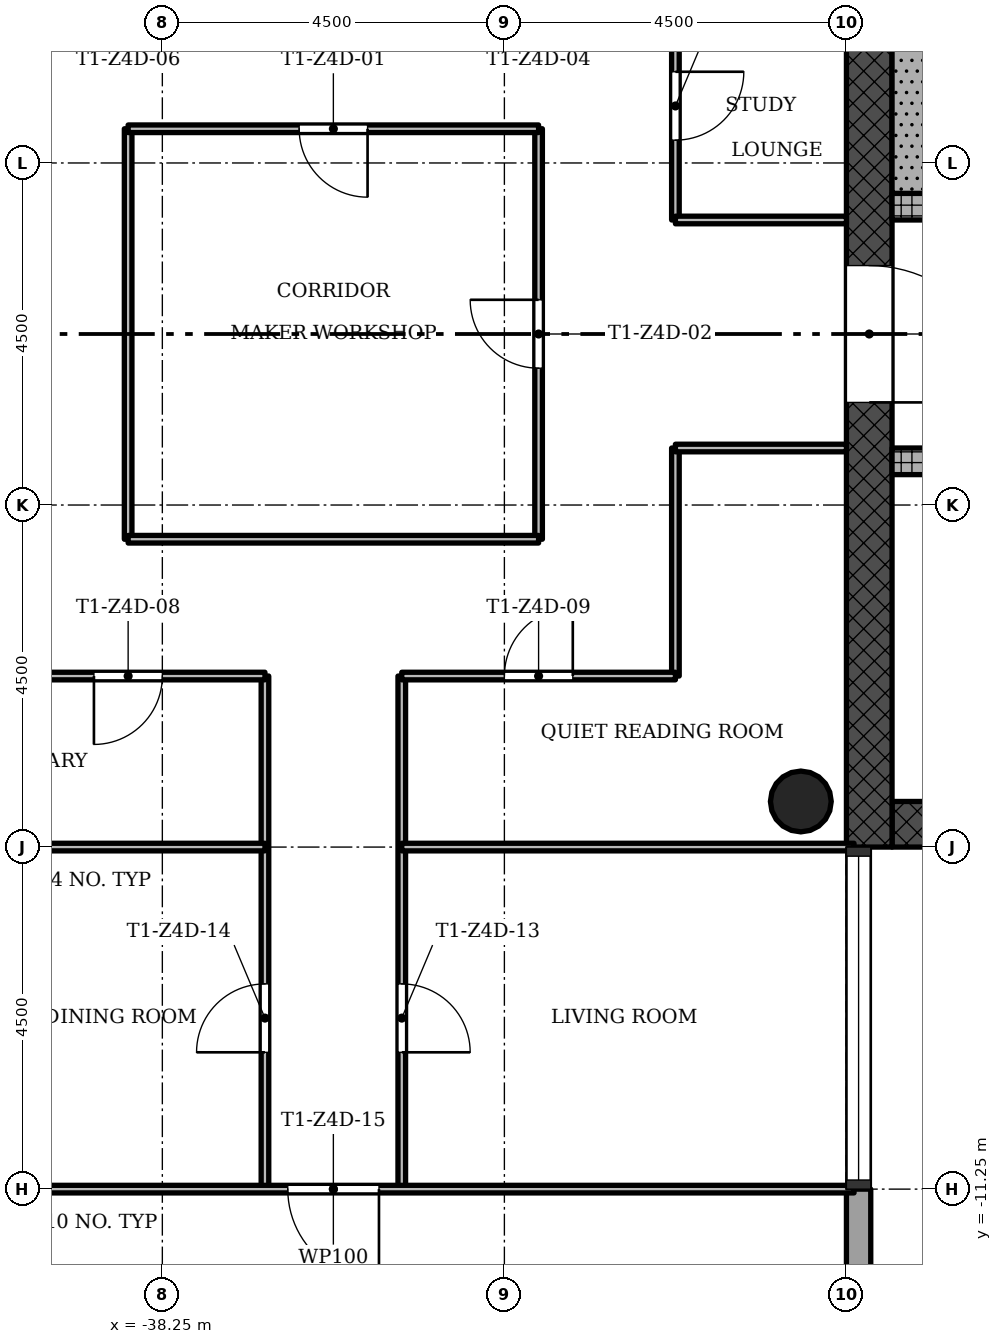
"""IFC4 building model, lengths in metres.
Left out: names, types, materials, properties, quantities, classifications, styles, units other than length and angle.
Written with IfcOpenShell. Run it as: python <this file> out.ifc"""

import sys

from ifc_helpers import new_model, si_unit, direction, frame, frame_2d, origin, origin_2d, place, context, subcontext, project, spatial, rectangle, hollow_circle, extrude, element, fill, save


model = new_model("IFC4")
c1 = context("Model", 3, precision=1e-05, world=origin(), true_north=direction((0.0, 1.0)))
c2 = subcontext(c1, "Body", "Model", "MODEL_VIEW")
j1 = project(units=[si_unit("LENGTHUNIT", "METRE"), si_unit("PLANEANGLEUNIT", "RADIAN")], contexts=[c1])
p1 = place(None, origin())
s1 = spatial("IfcSite", under=j1, at=p1, CompositionType="ELEMENT")
p2 = place(p1, origin())
s2 = spatial("IfcBuilding", under=s1, at=p2, CompositionType="ELEMENT")
p3 = place(p2, frame((0.0, 0.0, 196.0)))
s3 = spatial("IfcBuildingStorey", under=s2, at=p3, CompositionType="ELEMENT", Elevation=196.0)
p4 = place(p3, frame((-28.65, -6.45, 0.0), z_axis=(0.0, 0.0, 1.0), x_axis=(1.0, 0.0, 0.0)))
e1 = element("IfcWall", 1, at=p4, inside=s3, PredefinedType="SHEAR", context=c2, shape_type="SweptSolid", body=[
    extrude(rectangle(XDim=8.4, YDim=0.6, at=frame_2d((4.2, 0.0))), origin(), (0.0, 0.0, 1.0), 3.4),
])
p5 = place(p3, frame((-28.95, 6.15, 0.0), z_axis=(0.0, 0.0, 1.0), x_axis=(0.0, -1.0, 0.0)))
e2 = element("IfcWall", 2, at=p5, inside=s3, PredefinedType="SHEAR", context=c2, shape_type="SweptSolid", body=[
    extrude(rectangle(XDim=12.9, YDim=0.6, at=frame_2d((6.45, 0.0))), origin(), (0.0, 0.0, 1.0), 3.4),
])
p6 = place(p5, frame((5.25, 0.0, 0.0)))
e3 = element("IfcOpeningElement", 3, at=p6, cuts=e2, PredefinedType="OPENING", context=c2, shape_type="SweptSolid", body=[
    extrude(rectangle(XDim=1.8, YDim=2.1, at=frame_2d((0.9, 1.05))), frame((0.0, 0.31, 0.0), z_axis=(0.0, -1.0, 0.0), x_axis=(1.0, 0.0, 0.0)), (0.0, 0.0, 1.0), 0.62),
])
p7 = place(p3, frame((-28.65, -1.675, 0.0), z_axis=(0.0, 0.0, 1.0), x_axis=(1.0, 0.0, 0.0)))
e4 = element("IfcWall", 4, at=p7, inside=s3, PredefinedType="SHEAR", context=c2, shape_type="SweptSolid", body=[
    extrude(rectangle(XDim=7.8, YDim=0.35, at=frame_2d((3.9, 0.0))), origin(), (0.0, 0.0, 1.0), 3.4),
])
p8 = place(p7, frame((1.15, 0.0, 0.0)))
e5 = element("IfcOpeningElement", 5, at=p8, cuts=e4, PredefinedType="OPENING", context=c2, shape_type="SweptSolid", body=[
    extrude(rectangle(XDim=1.1, YDim=2.1, at=frame_2d((0.55, 1.05))), frame((0.0, 0.185, 0.0), z_axis=(0.0, -1.0, 0.0), x_axis=(1.0, 0.0, 0.0)), (0.0, 0.0, 1.0), 0.37),
])
p9 = place(p7, frame((3.35, 0.0, 0.0)))
e6 = element("IfcOpeningElement", 6, at=p9, cuts=e4, PredefinedType="OPENING", context=c2, shape_type="SweptSolid", body=[
    extrude(rectangle(XDim=1.1, YDim=2.1, at=frame_2d((0.55, 1.05))), frame((0.0, 0.185, 0.0), z_axis=(0.0, -1.0, 0.0), x_axis=(1.0, 0.0, 0.0)), (0.0, 0.0, 1.0), 0.37),
])
p10 = place(p7, frame((5.55, 0.0, 0.0)))
e7 = element("IfcOpeningElement", 7, at=p10, cuts=e4, PredefinedType="OPENING", context=c2, shape_type="SweptSolid", body=[
    extrude(rectangle(XDim=1.1, YDim=2.1, at=frame_2d((0.55, 1.05))), frame((0.0, 0.185, 0.0), z_axis=(0.0, -1.0, 0.0), x_axis=(1.0, 0.0, 0.0)), (0.0, 0.0, 1.0), 0.37),
])
p11 = place(p3, frame((-28.65, 1.675, 0.0), z_axis=(0.0, 0.0, 1.0), x_axis=(1.0, 0.0, 0.0)))
e8 = element("IfcWall", 8, at=p11, inside=s3, PredefinedType="SHEAR", context=c2, shape_type="SweptSolid", body=[
    extrude(rectangle(XDim=7.8, YDim=0.35, at=frame_2d((3.9, 0.0))), origin(), (0.0, 0.0, 1.0), 3.4),
])
p12 = place(p11, frame((1.05, 0.0, 0.0)))
e9 = element("IfcOpeningElement", 9, at=p12, cuts=e8, PredefinedType="OPENING", context=c2, shape_type="SweptSolid", body=[
    extrude(rectangle(XDim=0.9, YDim=2.1, at=frame_2d((0.45, 1.05))), frame((0.0, 0.185, 0.0), z_axis=(0.0, -1.0, 0.0), x_axis=(1.0, 0.0, 0.0)), (0.0, 0.0, 1.0), 0.37),
])
p13 = place(p3, frame((-29.85, -6.15, 0.0), z_axis=(0.0, 0.0, 1.0), x_axis=(1.0, 0.0, 0.0)))
e10 = element("IfcColumn", 10, at=p13, inside=s3, PredefinedType="COLUMN", context=c2, shape_type="SweptSolid", body=[
    extrude(hollow_circle(Radius=0.4, WallThickness=0.028, at=origin_2d()), origin(), (0.0, 0.0, 1.0), 3.4),
])
p14 = place(p3, frame((-29.09, -12.75, -0.3), z_axis=(0.0, 0.0, 1.0), x_axis=(0.0, 1.0, 0.0)))
e11 = element("IfcWall", 11, at=p14, inside=s3, PredefinedType="STANDARD", context=c2, shape_type="SweptSolid", body=[
    extrude(rectangle(XDim=1.5, YDim=0.32, at=frame_2d((0.75, 0.0))), origin(), (0.0, 0.0, 1.0), 3.4),
])
p15 = place(p3, frame((-38.7, -2.7, 0.0), z_axis=(0.0, 0.0, 1.0), x_axis=(0.0, 1.0, 0.0)))
e12 = element("IfcWall", 12, at=p15, inside=s3, PredefinedType="PARTITIONING", context=c2, shape_type="SweptSolid", body=[
    extrude(rectangle(XDim=5.4, YDim=0.1, at=frame_2d((2.7, 0.0))), origin(), (0.0, 0.0, 1.0), 3.0),
])
p16 = place(p3, frame((-36.9, -11.25, 0.0), z_axis=(0.0, 0.0, 1.0), x_axis=(0.0, 1.0, 0.0)))
e13 = element("IfcWall", 13, at=p16, inside=s3, PredefinedType="PARTITIONING", context=c2, shape_type="SweptSolid", body=[
    extrude(rectangle(XDim=6.75, YDim=0.1, at=frame_2d((3.375, 0.0))), origin(), (0.0, 0.0, 1.0), 3.0),
])
p17 = place(p16, frame((1.8, 0.0, 0.0)))
e14 = element("IfcOpeningElement", 14, at=p17, cuts=e13, PredefinedType="OPENING", context=c2, shape_type="SweptSolid", body=[
    extrude(rectangle(XDim=0.9, YDim=2.1, at=frame_2d((0.45, 1.05))), frame((0.0, 0.06, 0.0), z_axis=(0.0, -1.0, 0.0), x_axis=(1.0, 0.0, 0.0)), (0.0, 0.0, 1.0), 0.12),
])
p18 = place(p3, frame((-35.1, -11.25, 0.0), z_axis=(0.0, 0.0, 1.0), x_axis=(0.0, 1.0, 0.0)))
e15 = element("IfcWall", 15, at=p18, inside=s3, PredefinedType="PARTITIONING", context=c2, shape_type="SweptSolid", body=[
    extrude(rectangle(XDim=6.75, YDim=0.1, at=frame_2d((3.375, 0.0))), origin(), (0.0, 0.0, 1.0), 3.0),
])
p19 = place(p18, frame((1.8, 0.0, 0.0)))
e16 = element("IfcOpeningElement", 16, at=p19, cuts=e15, PredefinedType="OPENING", context=c2, shape_type="SweptSolid", body=[
    extrude(rectangle(XDim=0.9, YDim=2.1, at=frame_2d((0.45, 1.05))), frame((0.0, 0.06, 0.0), z_axis=(0.0, -1.0, 0.0), x_axis=(1.0, 0.0, 0.0)), (0.0, 0.0, 1.0), 0.12),
])
p20 = place(p3, frame((-33.3, -2.7, 0.0), z_axis=(0.0, 0.0, 1.0), x_axis=(0.0, 1.0, 0.0)))
e17 = element("IfcWall", 17, at=p20, inside=s3, PredefinedType="PARTITIONING", context=c2, shape_type="SweptSolid", body=[
    extrude(rectangle(XDim=5.4, YDim=0.1, at=frame_2d((2.7, 0.0))), origin(), (0.0, 0.0, 1.0), 3.0),
])
p21 = place(p20, frame((2.25, 0.0, 0.0)))
e18 = element("IfcOpeningElement", 18, at=p21, cuts=e17, PredefinedType="OPENING", context=c2, shape_type="SweptSolid", body=[
    extrude(rectangle(XDim=0.9, YDim=2.1, at=frame_2d((0.45, 1.05))), frame((0.0, 0.06, 0.0), z_axis=(0.0, -1.0, 0.0), x_axis=(1.0, 0.0, 0.0)), (0.0, 0.0, 1.0), 0.12),
])
p22 = place(p3, frame((-31.5, -4.5, 0.0), z_axis=(0.0, 0.0, 1.0), x_axis=(0.0, 1.0, 0.0)))
e19 = element("IfcWall", 19, at=p22, inside=s3, PredefinedType="PARTITIONING", context=c2, shape_type="SweptSolid", body=[
    extrude(rectangle(XDim=3.0, YDim=0.1, at=frame_2d((1.5, 0.0))), origin(), (0.0, 0.0, 1.0), 3.0),
])
p23 = place(p3, frame((-31.5, 1.5, 0.0), z_axis=(0.0, 0.0, 1.0), x_axis=(0.0, 1.0, 0.0)))
e20 = element("IfcWall", 20, at=p23, inside=s3, PredefinedType="PARTITIONING", context=c2, shape_type="SweptSolid", body=[
    extrude(rectangle(XDim=3.0, YDim=0.1, at=frame_2d((1.5, 0.0))), origin(), (0.0, 0.0, 1.0), 3.0),
])
p24 = place(p23, frame((1.05, 0.0, 0.0)))
e21 = element("IfcOpeningElement", 21, at=p24, cuts=e20, PredefinedType="OPENING", context=c2, shape_type="SweptSolid", body=[
    extrude(rectangle(XDim=0.9, YDim=2.1, at=frame_2d((0.45, 1.05))), frame((0.0, 0.06, 0.0), z_axis=(0.0, -1.0, 0.0), x_axis=(1.0, 0.0, 0.0)), (0.0, 0.0, 1.0), 0.12),
])
p25 = place(p3, frame((-42.85, -11.25, 0.0), z_axis=(0.0, 0.0, 1.0), x_axis=(1.0, 0.0, 0.0)))
e22 = element("IfcWall", 22, at=p25, inside=s3, PredefinedType="PARTITIONING", context=c2, shape_type="SweptSolid", body=[
    extrude(rectangle(XDim=13.7, YDim=0.1, at=frame_2d((6.85, 0.0))), origin(), (0.0, 0.0, 1.0), 3.0),
])
p26 = place(p25, frame((6.25, 0.0, 0.0)))
e23 = element("IfcOpeningElement", 23, at=p26, cuts=e22, PredefinedType="OPENING", context=c2, shape_type="SweptSolid", body=[
    extrude(rectangle(XDim=1.2, YDim=2.1, at=frame_2d((0.6, 1.05))), frame((0.0, 0.06, 0.0), z_axis=(0.0, -1.0, 0.0), x_axis=(1.0, 0.0, 0.0)), (0.0, 0.0, 1.0), 0.12),
])
for number, where, z_axis, x_axis in (
    (24, (-42.85, -6.75, 0.0), (0.0, 0.0, 1.0), (1.0, 0.0, 0.0)),
    (25, (-35.1, -6.75, 0.0), (0.0, 0.0, 1.0), (1.0, 0.0, 0.0)),
):
    element("IfcWall", number, at=place(p3, frame(where, z_axis=z_axis, x_axis=x_axis)), inside=s3, PredefinedType="PARTITIONING", context=c2, shape_type="SweptSolid", body=[
        extrude(rectangle(XDim=5.95, YDim=0.1, at=frame_2d((2.975, 0.0))), origin(), (0.0, 0.0, 1.0), 3.0),
    ])
p27 = place(p3, frame((-40.5, -4.5, 0.0), z_axis=(0.0, 0.0, 1.0), x_axis=(1.0, 0.0, 0.0)))
e26 = element("IfcWall", 26, at=p27, inside=s3, PredefinedType="PARTITIONING", context=c2, shape_type="SweptSolid", body=[
    extrude(rectangle(XDim=3.6, YDim=0.1, at=frame_2d((1.8, 0.0))), origin(), (0.0, 0.0, 1.0), 3.0),
])
p28 = place(p27, frame((1.35, 0.0, 0.0)))
e27 = element("IfcOpeningElement", 27, at=p28, cuts=e26, PredefinedType="OPENING", context=c2, shape_type="SweptSolid", body=[
    extrude(rectangle(XDim=0.9, YDim=2.1, at=frame_2d((0.45, 1.05))), frame((0.0, 0.06, 0.0), z_axis=(0.0, -1.0, 0.0), x_axis=(1.0, 0.0, 0.0)), (0.0, 0.0, 1.0), 0.12),
])
p29 = place(p3, frame((-35.1, -4.5, 0.0), z_axis=(0.0, 0.0, 1.0), x_axis=(1.0, 0.0, 0.0)))
e28 = element("IfcWall", 28, at=p29, inside=s3, PredefinedType="PARTITIONING", context=c2, shape_type="SweptSolid", body=[
    extrude(rectangle(XDim=3.6, YDim=0.1, at=frame_2d((1.8, 0.0))), origin(), (0.0, 0.0, 1.0), 3.0),
])
p30 = place(p29, frame((1.35, 0.0, 0.0)))
e29 = element("IfcOpeningElement", 29, at=p30, cuts=e28, PredefinedType="OPENING", context=c2, shape_type="SweptSolid", body=[
    extrude(rectangle(XDim=0.9, YDim=2.1, at=frame_2d((0.45, 1.05))), frame((0.0, 0.06, 0.0), z_axis=(0.0, -1.0, 0.0), x_axis=(1.0, 0.0, 0.0)), (0.0, 0.0, 1.0), 0.12),
])
p31 = place(p3, frame((-38.7, -2.7, 0.0), z_axis=(0.0, 0.0, 1.0), x_axis=(1.0, 0.0, 0.0)))
e30 = element("IfcWall", 30, at=p31, inside=s3, PredefinedType="PARTITIONING", context=c2, shape_type="SweptSolid", body=[
    extrude(rectangle(XDim=5.4, YDim=0.1, at=frame_2d((2.7, 0.0))), origin(), (0.0, 0.0, 1.0), 3.0),
])
for number, where, z_axis, x_axis in (
    (31, (-31.5, -1.5, 0.0), (0.0, 0.0, 1.0), (1.0, 0.0, 0.0)),
    (32, (-31.5, 1.5, 0.0), (0.0, 0.0, 1.0), (1.0, 0.0, 0.0)),
):
    element("IfcWall", number, at=place(p3, frame(where, z_axis=z_axis, x_axis=x_axis)), inside=s3, PredefinedType="PARTITIONING", context=c2, shape_type="SweptSolid", body=[
        extrude(rectangle(XDim=2.25, YDim=0.1, at=frame_2d((1.125, 0.0))), origin(), (0.0, 0.0, 1.0), 3.0),
    ])
p32 = place(p3, frame((-38.7, 2.7, 0.0), z_axis=(0.0, 0.0, 1.0), x_axis=(1.0, 0.0, 0.0)))
e33 = element("IfcWall", 33, at=p32, inside=s3, PredefinedType="PARTITIONING", context=c2, shape_type="SweptSolid", body=[
    extrude(rectangle(XDim=5.4, YDim=0.1, at=frame_2d((2.7, 0.0))), origin(), (0.0, 0.0, 1.0), 3.0),
])
p33 = place(p32, frame((2.25, 0.0, 0.0)))
e34 = element("IfcOpeningElement", 34, at=p33, cuts=e33, PredefinedType="OPENING", context=c2, shape_type="SweptSolid", body=[
    extrude(rectangle(XDim=0.9, YDim=2.1, at=frame_2d((0.45, 1.05))), frame((0.0, 0.06, 0.0), z_axis=(0.0, -1.0, 0.0), x_axis=(1.0, 0.0, 0.0)), (0.0, 0.0, 1.0), 0.12),
])
p34 = place(p3, frame((-28.35, 1.85, 0.0), z_axis=(0.0, 0.0, 1.0), x_axis=(0.0, 1.0, 0.0)))
e35 = element("IfcWall", 35, at=p34, inside=s3, PredefinedType="SHEAR", context=c2, shape_type="SweptSolid", body=[
    extrude(rectangle(XDim=4.3, YDim=0.6, at=frame_2d((2.15, 0.0))), origin(), (0.0, 0.0, 1.0), 3.4),
])
p35 = place(p33, origin())
e36 = element("IfcDoor", 36, at=p35, inside=s3, OperationType="SINGLE_SWING_RIGHT", PredefinedType="DOOR", context=c2, shape_type="SweptSolid", body=[
    extrude(rectangle(XDim=0.9, YDim=2.1, at=frame_2d((0.45, 1.05))), frame((0.0, 0.025, 0.0), z_axis=(0.0, -1.0, 0.0), x_axis=(1.0, 0.0, 0.0)), (0.0, 0.0, 1.0), 0.05),
])
fill(e34, e36)
p36 = place(p21, origin())
e37 = element("IfcDoor", 37, at=p36, inside=s3, OperationType="SINGLE_SWING_LEFT", PredefinedType="DOOR", context=c2, shape_type="SweptSolid", body=[
    extrude(rectangle(XDim=0.9, YDim=2.1, at=frame_2d((0.45, 1.05))), frame((0.0, 0.025, 0.0), z_axis=(0.0, -1.0, 0.0), x_axis=(1.0, 0.0, 0.0)), (0.0, 0.0, 1.0), 0.05),
])
fill(e18, e37)
p37 = place(p24, origin())
e38 = element("IfcDoor", 38, at=p37, inside=s3, OperationType="SINGLE_SWING_RIGHT", PredefinedType="DOOR", context=c2, shape_type="SweptSolid", body=[
    extrude(rectangle(XDim=0.9, YDim=2.1, at=frame_2d((0.45, 1.05))), frame((0.0, 0.025, 0.0), z_axis=(0.0, -1.0, 0.0), x_axis=(1.0, 0.0, 0.0)), (0.0, 0.0, 1.0), 0.05),
])
fill(e21, e38)
p38 = place(p28, origin())
e39 = element("IfcDoor", 39, at=p38, inside=s3, OperationType="SINGLE_SWING_LEFT", PredefinedType="DOOR", context=c2, shape_type="SweptSolid", body=[
    extrude(rectangle(XDim=0.9, YDim=2.1, at=frame_2d((0.45, 1.05))), frame((0.0, 0.025, 0.0), z_axis=(0.0, -1.0, 0.0), x_axis=(1.0, 0.0, 0.0)), (0.0, 0.0, 1.0), 0.05),
])
fill(e27, e39)
p39 = place(p30, origin())
e40 = element("IfcDoor", 40, at=p39, inside=s3, OperationType="SINGLE_SWING_LEFT", PredefinedType="DOOR", context=c2, shape_type="SweptSolid", body=[
    extrude(rectangle(XDim=0.9, YDim=2.1, at=frame_2d((0.45, 1.05))), frame((0.0, 0.025, 0.0), z_axis=(0.0, -1.0, 0.0), x_axis=(1.0, 0.0, 0.0)), (0.0, 0.0, 1.0), 0.05),
])
fill(e29, e40)
p40 = place(p19, origin())
e41 = element("IfcDoor", 41, at=p40, inside=s3, OperationType="SINGLE_SWING_LEFT", PredefinedType="DOOR", context=c2, shape_type="SweptSolid", body=[
    extrude(rectangle(XDim=0.9, YDim=2.1, at=frame_2d((0.45, 1.05))), frame((0.0, 0.025, 0.0), z_axis=(0.0, -1.0, 0.0), x_axis=(1.0, 0.0, 0.0)), (0.0, 0.0, 1.0), 0.05),
])
fill(e16, e41)
p41 = place(p17, origin())
e42 = element("IfcDoor", 42, at=p41, inside=s3, OperationType="SINGLE_SWING_RIGHT", PredefinedType="DOOR", context=c2, shape_type="SweptSolid", body=[
    extrude(rectangle(XDim=0.9, YDim=2.1, at=frame_2d((0.45, 1.05))), frame((0.0, 0.025, 0.0), z_axis=(0.0, -1.0, 0.0), x_axis=(1.0, 0.0, 0.0)), (0.0, 0.0, 1.0), 0.05),
])
fill(e14, e42)
p42 = place(p26, origin())
e43 = element("IfcDoor", 43, at=p42, inside=s3, OperationType="SINGLE_SWING_RIGHT", PredefinedType="DOOR", context=c2, shape_type="SweptSolid", body=[
    extrude(rectangle(XDim=1.2, YDim=2.1, at=frame_2d((0.6, 1.05))), frame((0.0, 0.025, 0.0), z_axis=(0.0, -1.0, 0.0), x_axis=(1.0, 0.0, 0.0)), (0.0, 0.0, 1.0), 0.05),
])
fill(e23, e43)
p43 = place(p6, origin())
e44 = element("IfcDoor", 44, at=p43, inside=s3, OperationType="SINGLE_SWING_LEFT", PredefinedType="DOOR", context=c2, shape_type="SweptSolid", body=[
    extrude(rectangle(XDim=1.8, YDim=2.1, at=frame_2d((0.9, 1.05))), frame((0.0, 0.025, 0.0), z_axis=(0.0, -1.0, 0.0), x_axis=(1.0, 0.0, 0.0)), (0.0, 0.0, 1.0), 0.05),
])
fill(e3, e44)
save(model, sys.argv[1])
